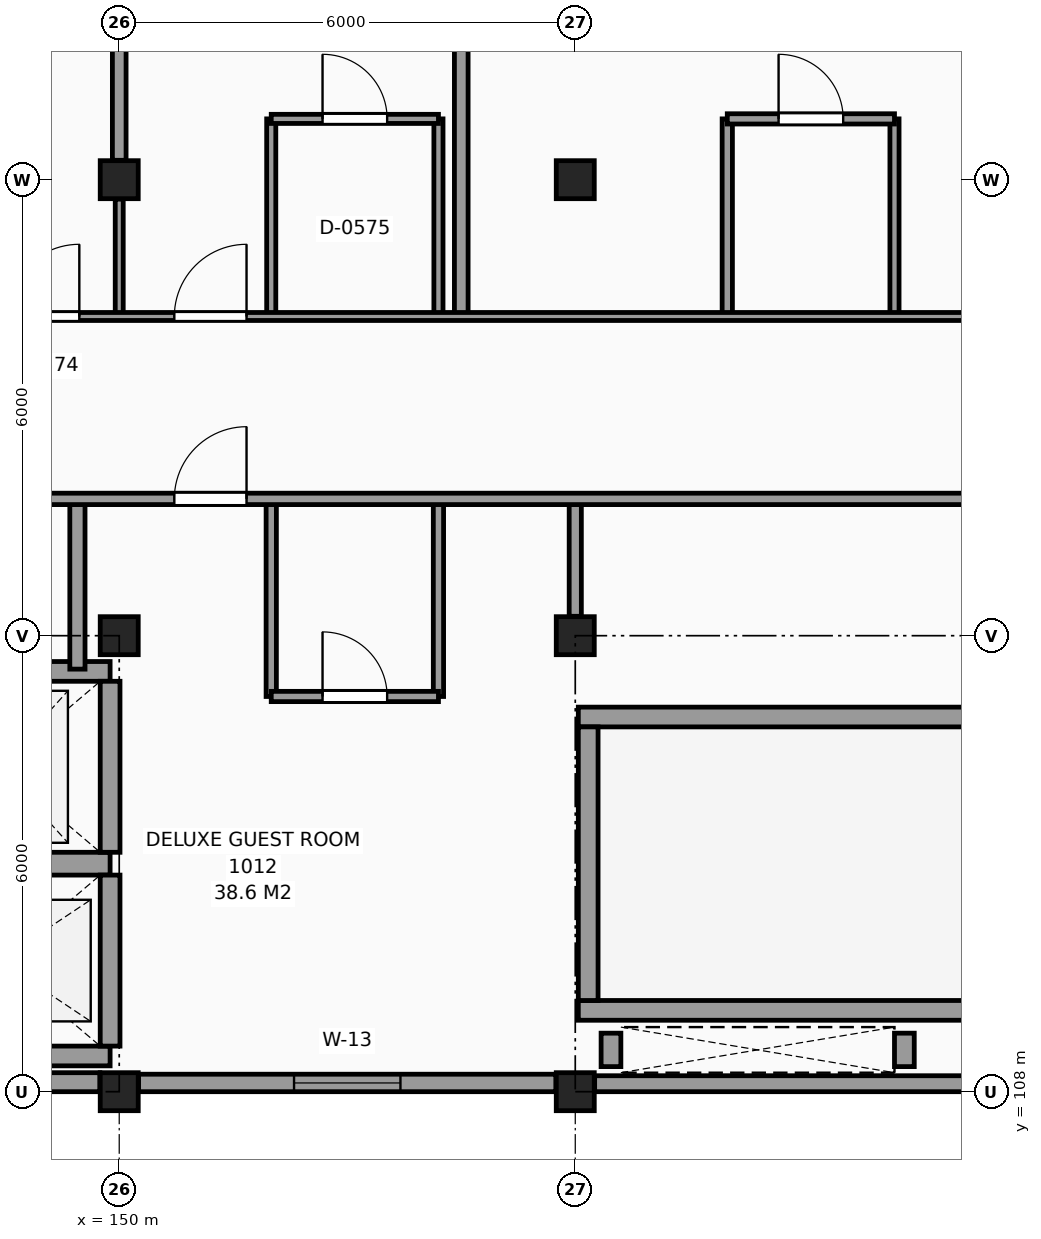
"""IFC4 building model, lengths in metres.
Left out: names, types, materials, properties, quantities, classifications, styles, units other than length and angle.
Written with IfcOpenShell. Run it as: python <this file> out.ifc"""

import sys

from ifc_helpers import new_model, si_unit, direction, frame, frame_2d, origin, origin_2d, place, context, subcontext, project, spatial, rectangle, extrude, element, fill, save


model = new_model("IFC4")
c1 = context("Model", 3, precision=1e-05, world=origin(), true_north=direction((0.0, 1.0)))
c2 = subcontext(c1, "Body", "Model", "MODEL_VIEW")
j1 = project(units=[si_unit("LENGTHUNIT", "METRE"), si_unit("PLANEANGLEUNIT", "RADIAN")], contexts=[c1])
p1 = place(None, origin())
s1 = spatial("IfcSite", under=j1, at=p1, CompositionType="ELEMENT")
p2 = place(p1, origin())
s2 = spatial("IfcBuilding", under=s1, at=p2, CompositionType="ELEMENT")
p3 = place(p2, frame((0.0, 0.0, 41.4)))
s3 = spatial("IfcBuildingStorey", under=s2, at=p3, CompositionType="ELEMENT", Elevation=41.4)
for number, where, z_axis, x_axis in (
    (1, (150.0, 108.0, 0.0), (0.0, 0.0, 1.0), (1.0, 0.0, 0.0)),
    (2, (150.0, 114.0, 0.0), (0.0, 0.0, 1.0), (1.0, 0.0, 0.0)),
    (3, (150.0, 120.0, 0.0), (0.0, 0.0, 1.0), (1.0, 0.0, 0.0)),
    (4, (156.0, 108.0, 0.0), (0.0, 0.0, 1.0), (1.0, 0.0, 0.0)),
    (5, (156.0, 114.0, 0.0), (0.0, 0.0, 1.0), (1.0, 0.0, 0.0)),
    (6, (156.0, 120.0, 0.0), (0.0, 0.0, 1.0), (1.0, 0.0, 0.0)),
):
    element("IfcColumn", number, at=place(p3, frame(where, z_axis=z_axis, x_axis=x_axis)), inside=s3, PredefinedType="COLUMN", context=c2, shape_type="SweptSolid", body=[
        extrude(rectangle(XDim=0.5, YDim=0.5, at=origin_2d()), origin(), (0.0, 0.0, 1.0), 3.3),
    ])
p4 = place(p3, frame((144.255, 108.125, 0.0), z_axis=(0.0, 0.0, 1.0), x_axis=(1.0, 0.0, 0.0)))
e7 = element("IfcWall", 7, at=p4, inside=s3, PredefinedType="SOLIDWALL", context=c2, shape_type="SweptSolid", body=[
    extrude(rectangle(XDim=5.49, YDim=0.25, at=frame_2d((2.745, 0.0))), origin(), (0.0, 0.0, 1.0), 2.41),
])
p5 = place(p3, frame((150.255, 108.115, 0.0), z_axis=(0.0, 0.0, 1.0), x_axis=(1.0, 0.0, 0.0)))
e8 = element("IfcWall", 8, at=p5, inside=s3, PredefinedType="SOLIDWALL", context=c2, shape_type="SweptSolid", body=[
    extrude(rectangle(XDim=5.49, YDim=0.23, at=frame_2d((2.745, 0.0))), origin(), (0.0, 0.0, 1.0), 2.41),
])
p6 = place(p5, frame((2.045, 0.0, 0.8)))
e9 = element("IfcOpeningElement", 9, at=p6, cuts=e8, PredefinedType="OPENING", context=c2, shape_type="SweptSolid", body=[
    extrude(rectangle(XDim=1.4, YDim=1.4, at=frame_2d((0.7, 0.7))), frame((0.0, 0.125, 0.0), z_axis=(0.0, -1.0, 0.0), x_axis=(1.0, 0.0, 0.0)), (0.0, 0.0, 1.0), 0.25),
])
p7 = place(p3, frame((156.255, 108.105, 0.0), z_axis=(0.0, 0.0, 1.0), x_axis=(1.0, 0.0, 0.0)))
e10 = element("IfcWall", 10, at=p7, inside=s3, PredefinedType="SOLIDWALL", context=c2, shape_type="SweptSolid", body=[
    extrude(rectangle(XDim=5.49, YDim=0.21, at=frame_2d((2.745, 0.0))), origin(), (0.0, 0.0, 1.0), 3.06),
])
for number, where, z_axis, x_axis in (
    (11, (156.04, 109.07, 0.0), (0.0, 0.0, 1.0), (1.0, 0.0, 0.0)),
    (12, (156.04, 112.93, 0.0), (0.0, 0.0, 1.0), (1.0, 0.0, 0.0)),
):
    element("IfcWall", number, at=place(p3, frame(where, z_axis=z_axis, x_axis=x_axis)), inside=s3, PredefinedType="SHEAR", context=c2, shape_type="SweptSolid", body=[
        extrude(rectangle(XDim=10.72, YDim=0.26, at=frame_2d((5.36, 0.0))), origin(), (0.0, 0.0, 1.0), 3.3),
    ])
p8 = place(p3, frame((156.17, 109.2, 0.0), z_axis=(0.0, 0.0, 1.0), x_axis=(0.0, 1.0, 0.0)))
e13 = element("IfcWall", 13, at=p8, inside=s3, PredefinedType="SHEAR", context=c2, shape_type="SweptSolid", body=[
    extrude(rectangle(XDim=3.6, YDim=0.26, at=frame_2d((1.8, 0.0))), origin(), (0.0, 0.0, 1.0), 3.3),
])
for number, where, z_axis, x_axis in (
    (14, (156.47, 108.33, 0.0), (0.0, 0.0, 1.0), (0.0, 1.0, 0.0)),
    (15, (160.33, 108.33, 0.0), (0.0, 0.0, 1.0), (0.0, 1.0, 0.0)),
):
    element("IfcWall", number, at=place(p3, frame(where, z_axis=z_axis, x_axis=x_axis)), inside=s3, PredefinedType="SHEAR", context=c2, shape_type="SweptSolid", body=[
        extrude(rectangle(XDim=0.44, YDim=0.26, at=frame_2d((0.22, 0.0))), origin(), (0.0, 0.0, 1.0), 3.3),
    ])
p9 = place(p3, frame((146.97, 108.47, 0.0), z_axis=(0.0, 0.0, 1.0), x_axis=(1.0, 0.0, 0.0)))
e16 = element("IfcWall", 16, at=p9, inside=s3, PredefinedType="SHEAR", context=c2, shape_type="SweptSolid", body=[
    extrude(rectangle(XDim=2.91, YDim=0.26, at=frame_2d((1.455, 0.0))), origin(), (0.0, 0.0, 1.0), 3.3),
])
p10 = place(p3, frame((146.97, 111.0, 0.0), z_axis=(0.0, 0.0, 1.0), x_axis=(1.0, 0.0, 0.0)))
e17 = element("IfcWall", 17, at=p10, inside=s3, PredefinedType="SHEAR", context=c2, shape_type="SweptSolid", body=[
    extrude(rectangle(XDim=2.91, YDim=0.3, at=frame_2d((1.455, 0.0))), origin(), (0.0, 0.0, 1.0), 3.3),
])
p11 = place(p3, frame((149.88, 108.6, 0.0), z_axis=(0.0, 0.0, 1.0), x_axis=(0.0, 1.0, 0.0)))
e18 = element("IfcWall", 18, at=p11, inside=s3, PredefinedType="SHEAR", context=c2, shape_type="SweptSolid", body=[
    extrude(rectangle(XDim=2.25, YDim=0.26, at=frame_2d((1.125, 0.0))), origin(), (0.0, 0.0, 1.0), 3.3),
])
p12 = place(p3, frame((146.97, 113.53, 0.0), z_axis=(0.0, 0.0, 1.0), x_axis=(1.0, 0.0, 0.0)))
e19 = element("IfcWall", 19, at=p12, inside=s3, PredefinedType="SHEAR", context=c2, shape_type="SweptSolid", body=[
    extrude(rectangle(XDim=2.91, YDim=0.26, at=frame_2d((1.455, 0.0))), origin(), (0.0, 0.0, 1.0), 3.3),
])
p13 = place(p3, frame((149.88, 111.15, 0.0), z_axis=(0.0, 0.0, 1.0), x_axis=(0.0, 1.0, 0.0)))
e20 = element("IfcWall", 20, at=p13, inside=s3, PredefinedType="SHEAR", context=c2, shape_type="SweptSolid", body=[
    extrude(rectangle(XDim=2.25, YDim=0.26, at=frame_2d((1.125, 0.0))), origin(), (0.0, 0.0, 1.0), 3.3),
])
p14 = place(p3, frame((149.45, 113.56, 0.0), z_axis=(0.0, 0.0, 1.0), x_axis=(0.0, 1.0, 0.0)))
e21 = element("IfcWall", 21, at=p14, inside=s3, PredefinedType="PARTITIONING", context=c2, shape_type="SweptSolid", body=[
    extrude(rectangle(XDim=2.24, YDim=0.2, at=frame_2d((1.12, 0.0))), origin(), (0.0, 0.0, 1.0), 3.06),
])
p15 = place(p3, frame((150.0, 118.2, 0.0), z_axis=(0.0, 0.0, 1.0), x_axis=(0.0, 1.0, 0.0)))
e22 = element("IfcWall", 22, at=p15, inside=s3, PredefinedType="PARTITIONING", context=c2, shape_type="SweptSolid", body=[
    extrude(rectangle(XDim=1.545, YDim=0.105, at=frame_2d((0.772, 0.0))), origin(), (0.0, 0.0, 1.0), 2.26),
])
p16 = place(p3, frame((150.0, 120.255, 0.0), z_axis=(0.0, 0.0, 1.0), x_axis=(0.0, 1.0, 0.0)))
e23 = element("IfcWall", 23, at=p16, inside=s3, PredefinedType="PARTITIONING", context=c2, shape_type="SweptSolid", body=[
    extrude(rectangle(XDim=5.465, YDim=0.18, at=frame_2d((2.732, 0.0))), origin(), (0.0, 0.0, 1.0), 2.36),
])
p17 = place(p3, frame((152.0, 113.2, 0.0), z_axis=(0.0, 0.0, 1.0), x_axis=(0.0, 1.0, 0.0)))
e24 = element("IfcWall", 24, at=p17, inside=s3, PredefinedType="PARTITIONING", context=c2, shape_type="SweptSolid", body=[
    extrude(rectangle(XDim=2.6, YDim=0.135, at=frame_2d((1.3, 0.0))), origin(), (0.0, 0.0, 1.0), 3.06),
])
p18 = place(p3, frame((152.0, 118.2, 0.0), z_axis=(0.0, 0.0, 1.0), x_axis=(0.0, 1.0, 0.0)))
e25 = element("IfcWall", 25, at=p18, inside=s3, PredefinedType="PARTITIONING", context=c2, shape_type="SweptSolid", body=[
    extrude(rectangle(XDim=2.6, YDim=0.12, at=frame_2d((1.3, 0.0))), origin(), (0.0, 0.0, 1.0), 3.06),
])
p19 = place(p3, frame((154.2, 113.2, 0.0), z_axis=(0.0, 0.0, 1.0), x_axis=(0.0, 1.0, 0.0)))
e26 = element("IfcWall", 26, at=p19, inside=s3, PredefinedType="PARTITIONING", context=c2, shape_type="SweptSolid", body=[
    extrude(rectangle(XDim=2.6, YDim=0.135, at=frame_2d((1.3, 0.0))), origin(), (0.0, 0.0, 1.0), 3.06),
])
p20 = place(p3, frame((154.2, 118.2, 0.0), z_axis=(0.0, 0.0, 1.0), x_axis=(0.0, 1.0, 0.0)))
e27 = element("IfcWall", 27, at=p20, inside=s3, PredefinedType="PARTITIONING", context=c2, shape_type="SweptSolid", body=[
    extrude(rectangle(XDim=2.6, YDim=0.12, at=frame_2d((1.3, 0.0))), origin(), (0.0, 0.0, 1.0), 3.06),
])
p21 = place(p3, frame((154.5, 118.2, 0.0), z_axis=(0.0, 0.0, 1.0), x_axis=(0.0, 1.0, 0.0)))
e28 = element("IfcWall", 28, at=p21, inside=s3, PredefinedType="PARTITIONING", context=c2, shape_type="SweptSolid", body=[
    extrude(rectangle(XDim=7.565, YDim=0.18, at=frame_2d((3.782, 0.0))), origin(), (0.0, 0.0, 1.0), 3.06),
])
p22 = place(p3, frame((156.0, 114.255, 0.0), z_axis=(0.0, 0.0, 1.0), x_axis=(0.0, 1.0, 0.0)))
e29 = element("IfcWall", 29, at=p22, inside=s3, PredefinedType="PARTITIONING", context=c2, shape_type="SweptSolid", body=[
    extrude(rectangle(XDim=1.545, YDim=0.16, at=frame_2d((0.772, 0.0))), origin(), (0.0, 0.0, 1.0), 2.26),
])
p23 = place(p3, frame((158.0, 118.2, 0.0), z_axis=(0.0, 0.0, 1.0), x_axis=(0.0, 1.0, 0.0)))
e30 = element("IfcWall", 30, at=p23, inside=s3, PredefinedType="PARTITIONING", context=c2, shape_type="SweptSolid", body=[
    extrude(rectangle(XDim=2.6, YDim=0.135, at=frame_2d((1.3, 0.0))), origin(), (0.0, 0.0, 1.0), 3.06),
])
p24 = place(p3, frame((160.2, 118.2, 0.0), z_axis=(0.0, 0.0, 1.0), x_axis=(0.0, 1.0, 0.0)))
e31 = element("IfcWall", 31, at=p24, inside=s3, PredefinedType="PARTITIONING", context=c2, shape_type="SweptSolid", body=[
    extrude(rectangle(XDim=2.6, YDim=0.12, at=frame_2d((1.3, 0.0))), origin(), (0.0, 0.0, 1.0), 3.06),
])
p25 = place(p3, frame((152.0, 113.2, 0.0), z_axis=(0.0, 0.0, 1.0), x_axis=(1.0, 0.0, 0.0)))
e32 = element("IfcWall", 32, at=p25, inside=s3, PredefinedType="PARTITIONING", context=c2, shape_type="SweptSolid", body=[
    extrude(rectangle(XDim=2.2, YDim=0.135, at=frame_2d((1.1, 0.0))), origin(), (0.0, 0.0, 1.0), 3.06),
])
p26 = place(p25, frame((0.675, 0.0, 0.0)))
e33 = element("IfcOpeningElement", 33, at=p26, cuts=e32, PredefinedType="OPENING", context=c2, shape_type="SweptSolid", body=[
    extrude(rectangle(XDim=0.85, YDim=2.1, at=frame_2d((0.425, 1.05))), frame((0.0, 0.078, 0.0), z_axis=(0.0, -1.0, 0.0), x_axis=(1.0, 0.0, 0.0)), (0.0, 0.0, 1.0), 0.155),
])
p27 = place(p3, frame((102.275, 115.8, 0.0), z_axis=(0.0, 0.0, 1.0), x_axis=(1.0, 0.0, 0.0)))
e34 = element("IfcWall", 34, at=p27, inside=s3, PredefinedType="PARTITIONING", context=c2, shape_type="SweptSolid", body=[
    extrude(rectangle(XDim=67.525, YDim=0.15, at=frame_2d((33.763, 0.0))), origin(), (0.0, 0.0, 1.0), 3.06),
])
p28 = place(p27, frame((44.125, 0.0, 0.0)))
e35 = element("IfcOpeningElement", 35, at=p28, cuts=e34, PredefinedType="OPENING", context=c2, shape_type="SweptSolid", body=[
    extrude(rectangle(XDim=1.2, YDim=2.2, at=frame_2d((0.6, 1.1))), frame((0.0, 0.085, 0.0), z_axis=(0.0, -1.0, 0.0), x_axis=(1.0, 0.0, 0.0)), (0.0, 0.0, 1.0), 0.17),
])
p29 = place(p27, frame((14.125, 0.0, 0.0)))
e36 = element("IfcOpeningElement", 36, at=p29, cuts=e34, PredefinedType="OPENING", context=c2, shape_type="SweptSolid", body=[
    extrude(rectangle(XDim=1.2, YDim=2.2, at=frame_2d((0.6, 1.1))), frame((0.0, 0.085, 0.0), z_axis=(0.0, -1.0, 0.0), x_axis=(1.0, 0.0, 0.0)), (0.0, 0.0, 1.0), 0.17),
])
p30 = place(p27, frame((19.275, 0.0, 0.0)))
e37 = element("IfcOpeningElement", 37, at=p30, cuts=e34, PredefinedType="OPENING", context=c2, shape_type="SweptSolid", body=[
    extrude(rectangle(XDim=1.0, YDim=2.15, at=frame_2d((0.5, 1.075))), frame((0.0, 0.085, 0.0), z_axis=(0.0, -1.0, 0.0), x_axis=(1.0, 0.0, 0.0)), (0.0, 0.0, 1.0), 0.17),
])
p31 = place(p27, frame((26.245, 0.0, 0.0)))
e38 = element("IfcOpeningElement", 38, at=p31, cuts=e34, PredefinedType="OPENING", context=c2, shape_type="SweptSolid", body=[
    extrude(rectangle(XDim=0.96, YDim=2.15, at=frame_2d((0.48, 1.075))), frame((0.0, 0.085, 0.0), z_axis=(0.0, -1.0, 0.0), x_axis=(1.0, 0.0, 0.0)), (0.0, 0.0, 1.0), 0.17),
])
p32 = place(p27, frame((48.45, 0.0, 0.0)))
e39 = element("IfcOpeningElement", 39, at=p32, cuts=e34, PredefinedType="OPENING", context=c2, shape_type="SweptSolid", body=[
    extrude(rectangle(XDim=0.95, YDim=2.1, at=frame_2d((0.475, 1.05))), frame((0.0, 0.085, 0.0), z_axis=(0.0, -1.0, 0.0), x_axis=(1.0, 0.0, 0.0)), (0.0, 0.0, 1.0), 0.17),
])
p33 = place(p3, frame((102.275, 118.2, 0.0), z_axis=(0.0, 0.0, 1.0), x_axis=(1.0, 0.0, 0.0)))
e40 = element("IfcWall", 40, at=p33, inside=s3, PredefinedType="PARTITIONING", context=c2, shape_type="SweptSolid", body=[
    extrude(rectangle(XDim=74.225, YDim=0.105, at=frame_2d((37.113, 0.0))), origin(), (0.0, 0.0, 1.0), 3.06),
])
p34 = place(p33, frame((7.55, 0.0, 0.0)))
e41 = element("IfcOpeningElement", 41, at=p34, cuts=e40, PredefinedType="OPENING", context=c2, shape_type="SweptSolid", body=[
    extrude(rectangle(XDim=0.95, YDim=2.1, at=frame_2d((0.475, 1.05))), frame((0.0, 0.062, 0.0), z_axis=(0.0, -1.0, 0.0), x_axis=(1.0, 0.0, 0.0)), (0.0, 0.0, 1.0), 0.125),
])
p35 = place(p33, frame((9.35, 0.0, 0.0)))
e42 = element("IfcOpeningElement", 42, at=p35, cuts=e40, PredefinedType="OPENING", context=c2, shape_type="SweptSolid", body=[
    extrude(rectangle(XDim=0.95, YDim=2.1, at=frame_2d((0.475, 1.05))), frame((0.0, 0.062, 0.0), z_axis=(0.0, -1.0, 0.0), x_axis=(1.0, 0.0, 0.0)), (0.0, 0.0, 1.0), 0.125),
])
p36 = place(p33, frame((24.05, 0.0, 0.0)))
e43 = element("IfcOpeningElement", 43, at=p36, cuts=e40, PredefinedType="OPENING", context=c2, shape_type="SweptSolid", body=[
    extrude(rectangle(XDim=0.95, YDim=2.1, at=frame_2d((0.475, 1.05))), frame((0.0, 0.062, 0.0), z_axis=(0.0, -1.0, 0.0), x_axis=(1.0, 0.0, 0.0)), (0.0, 0.0, 1.0), 0.125),
])
p37 = place(p33, frame((28.25, 0.0, 0.0)))
e44 = element("IfcOpeningElement", 44, at=p37, cuts=e40, PredefinedType="OPENING", context=c2, shape_type="SweptSolid", body=[
    extrude(rectangle(XDim=0.95, YDim=2.1, at=frame_2d((0.475, 1.05))), frame((0.0, 0.062, 0.0), z_axis=(0.0, -1.0, 0.0), x_axis=(1.0, 0.0, 0.0)), (0.0, 0.0, 1.0), 0.125),
])
p38 = place(p33, frame((30.45, 0.0, 0.0)))
e45 = element("IfcOpeningElement", 45, at=p38, cuts=e40, PredefinedType="OPENING", context=c2, shape_type="SweptSolid", body=[
    extrude(rectangle(XDim=0.95, YDim=2.1, at=frame_2d((0.475, 1.05))), frame((0.0, 0.062, 0.0), z_axis=(0.0, -1.0, 0.0), x_axis=(1.0, 0.0, 0.0)), (0.0, 0.0, 1.0), 0.125),
])
p39 = place(p33, frame((36.45, 0.0, 0.0)))
e46 = element("IfcOpeningElement", 46, at=p39, cuts=e40, PredefinedType="OPENING", context=c2, shape_type="SweptSolid", body=[
    extrude(rectangle(XDim=0.95, YDim=2.1, at=frame_2d((0.475, 1.05))), frame((0.0, 0.062, 0.0), z_axis=(0.0, -1.0, 0.0), x_axis=(1.0, 0.0, 0.0)), (0.0, 0.0, 1.0), 0.125),
])
p40 = place(p33, frame((46.25, 0.0, 0.0)))
e47 = element("IfcOpeningElement", 47, at=p40, cuts=e40, PredefinedType="OPENING", context=c2, shape_type="SweptSolid", body=[
    extrude(rectangle(XDim=0.95, YDim=2.1, at=frame_2d((0.475, 1.05))), frame((0.0, 0.062, 0.0), z_axis=(0.0, -1.0, 0.0), x_axis=(1.0, 0.0, 0.0)), (0.0, 0.0, 1.0), 0.125),
])
p41 = place(p33, frame((48.45, 0.0, 0.0)))
e48 = element("IfcOpeningElement", 48, at=p41, cuts=e40, PredefinedType="OPENING", context=c2, shape_type="SweptSolid", body=[
    extrude(rectangle(XDim=0.95, YDim=2.1, at=frame_2d((0.475, 1.05))), frame((0.0, 0.062, 0.0), z_axis=(0.0, -1.0, 0.0), x_axis=(1.0, 0.0, 0.0)), (0.0, 0.0, 1.0), 0.125),
])
p42 = place(p33, frame((62.3, 0.0, 0.0)))
e49 = element("IfcOpeningElement", 49, at=p42, cuts=e40, PredefinedType="OPENING", context=c2, shape_type="SweptSolid", body=[
    extrude(rectangle(XDim=0.95, YDim=2.1, at=frame_2d((0.475, 1.05))), frame((0.0, 0.062, 0.0), z_axis=(0.0, -1.0, 0.0), x_axis=(1.0, 0.0, 0.0)), (0.0, 0.0, 1.0), 0.125),
])
p43 = place(p33, frame((64.85, 0.0, 0.0)))
e50 = element("IfcOpeningElement", 50, at=p43, cuts=e40, PredefinedType="OPENING", context=c2, shape_type="SweptSolid", body=[
    extrude(rectangle(XDim=0.95, YDim=2.1, at=frame_2d((0.475, 1.05))), frame((0.0, 0.062, 0.0), z_axis=(0.0, -1.0, 0.0), x_axis=(1.0, 0.0, 0.0)), (0.0, 0.0, 1.0), 0.125),
])
p44 = place(p33, frame((68.95, 0.0, 0.0)))
e51 = element("IfcOpeningElement", 51, at=p44, cuts=e40, PredefinedType="OPENING", context=c2, shape_type="SweptSolid", body=[
    extrude(rectangle(XDim=0.95, YDim=2.1, at=frame_2d((0.475, 1.05))), frame((0.0, 0.062, 0.0), z_axis=(0.0, -1.0, 0.0), x_axis=(1.0, 0.0, 0.0)), (0.0, 0.0, 1.0), 0.125),
])
p45 = place(p3, frame((152.0, 120.8, 0.0), z_axis=(0.0, 0.0, 1.0), x_axis=(1.0, 0.0, 0.0)))
e52 = element("IfcWall", 52, at=p45, inside=s3, PredefinedType="PARTITIONING", context=c2, shape_type="SweptSolid", body=[
    extrude(rectangle(XDim=2.2, YDim=0.12, at=frame_2d((1.1, 0.0))), origin(), (0.0, 0.0, 1.0), 3.06),
])
p46 = place(p45, frame((0.675, 0.0, 0.0)))
e53 = element("IfcOpeningElement", 53, at=p46, cuts=e52, PredefinedType="OPENING", context=c2, shape_type="SweptSolid", body=[
    extrude(rectangle(XDim=0.85, YDim=2.1, at=frame_2d((0.425, 1.05))), frame((0.0, 0.07, 0.0), z_axis=(0.0, -1.0, 0.0), x_axis=(1.0, 0.0, 0.0)), (0.0, 0.0, 1.0), 0.14),
])
p47 = place(p3, frame((158.0, 120.8, 0.0), z_axis=(0.0, 0.0, 1.0), x_axis=(1.0, 0.0, 0.0)))
e54 = element("IfcWall", 54, at=p47, inside=s3, PredefinedType="PARTITIONING", context=c2, shape_type="SweptSolid", body=[
    extrude(rectangle(XDim=2.2, YDim=0.135, at=frame_2d((1.1, 0.0))), origin(), (0.0, 0.0, 1.0), 3.06),
])
p48 = place(p47, frame((0.675, 0.0, 0.0)))
e55 = element("IfcOpeningElement", 55, at=p48, cuts=e54, PredefinedType="OPENING", context=c2, shape_type="SweptSolid", body=[
    extrude(rectangle(XDim=0.85, YDim=2.1, at=frame_2d((0.425, 1.05))), frame((0.0, 0.078, 0.0), z_axis=(0.0, -1.0, 0.0), x_axis=(1.0, 0.0, 0.0)), (0.0, 0.0, 1.0), 0.155),
])
p49 = place(p6, origin())
e56 = element("IfcWindow", 56, at=p49, inside=s3, PartitioningType="SINGLE_PANEL", PredefinedType="WINDOW", context=c2, shape_type="SweptSolid", body=[
    extrude(rectangle(XDim=1.4, YDim=1.4, at=frame_2d((0.7, 0.7))), frame((0.0, 0.03, 0.0), z_axis=(0.0, -1.0, 0.0), x_axis=(1.0, 0.0, 0.0)), (0.0, 0.0, 1.0), 0.06),
])
fill(e9, e56)
p50 = place(p40, origin())
e57 = element("IfcDoor", 57, at=p50, inside=s3, OperationType="SINGLE_SWING_RIGHT", PredefinedType="DOOR", context=c2, shape_type="SweptSolid", body=[
    extrude(rectangle(XDim=0.95, YDim=2.1, at=frame_2d((0.475, 1.05))), frame((0.0, 0.025, 0.0), z_axis=(0.0, -1.0, 0.0), x_axis=(1.0, 0.0, 0.0)), (0.0, 0.0, 1.0), 0.05),
])
fill(e47, e57)
p51 = place(p46, origin())
e58 = element("IfcDoor", 58, at=p51, inside=s3, OperationType="SINGLE_SWING_LEFT", PredefinedType="DOOR", context=c2, shape_type="SweptSolid", body=[
    extrude(rectangle(XDim=0.85, YDim=2.1, at=frame_2d((0.425, 1.05))), frame((0.0, 0.025, 0.0), z_axis=(0.0, -1.0, 0.0), x_axis=(1.0, 0.0, 0.0)), (0.0, 0.0, 1.0), 0.05),
])
fill(e53, e58)
p52 = place(p41, origin())
e59 = element("IfcDoor", 59, at=p52, inside=s3, OperationType="SINGLE_SWING_RIGHT", PredefinedType="DOOR", context=c2, shape_type="SweptSolid", body=[
    extrude(rectangle(XDim=0.95, YDim=2.1, at=frame_2d((0.475, 1.05))), frame((0.0, 0.025, 0.0), z_axis=(0.0, -1.0, 0.0), x_axis=(1.0, 0.0, 0.0)), (0.0, 0.0, 1.0), 0.05),
])
fill(e48, e59)
p53 = place(p48, origin())
e60 = element("IfcDoor", 60, at=p53, inside=s3, OperationType="SINGLE_SWING_LEFT", PredefinedType="DOOR", context=c2, shape_type="SweptSolid", body=[
    extrude(rectangle(XDim=0.85, YDim=2.1, at=frame_2d((0.425, 1.05))), frame((0.0, 0.025, 0.0), z_axis=(0.0, -1.0, 0.0), x_axis=(1.0, 0.0, 0.0)), (0.0, 0.0, 1.0), 0.05),
])
fill(e55, e60)
p54 = place(p26, origin())
e61 = element("IfcDoor", 61, at=p54, inside=s3, OperationType="SINGLE_SWING_LEFT", PredefinedType="DOOR", context=c2, shape_type="SweptSolid", body=[
    extrude(rectangle(XDim=0.85, YDim=2.1, at=frame_2d((0.425, 1.05))), frame((0.0, 0.025, 0.0), z_axis=(0.0, -1.0, 0.0), x_axis=(1.0, 0.0, 0.0)), (0.0, 0.0, 1.0), 0.05),
])
fill(e33, e61)
p55 = place(p32, origin())
e62 = element("IfcDoor", 62, at=p55, inside=s3, OperationType="SINGLE_SWING_RIGHT", PredefinedType="DOOR", context=c2, shape_type="SweptSolid", body=[
    extrude(rectangle(XDim=0.95, YDim=2.1, at=frame_2d((0.475, 1.05))), frame((0.0, 0.025, 0.0), z_axis=(0.0, -1.0, 0.0), x_axis=(1.0, 0.0, 0.0)), (0.0, 0.0, 1.0), 0.05),
])
fill(e39, e62)
save(model, sys.argv[1])
